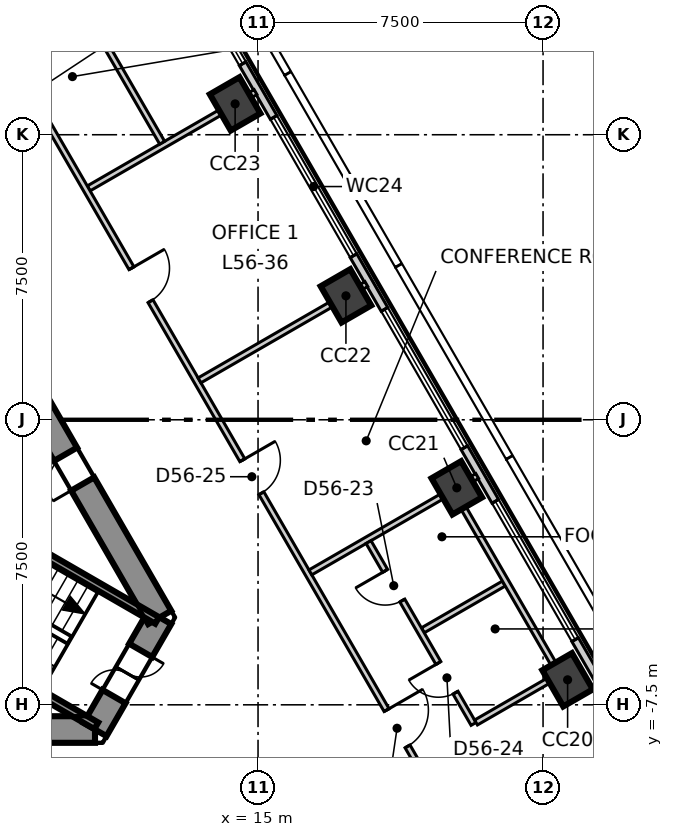
"""IFC4 building model, lengths in metres.
Left out: names, types, materials, properties, quantities, classifications, styles, units other than length and angle.
Written with IfcOpenShell. Run it as: python <this file> out.ifc"""

import sys

from ifc_helpers import new_model, si_unit, direction, frame, frame_2d, origin, origin_2d, place, context, subcontext, project, spatial, polyline, rectangle, outline, extrude, element, fill, save


model = new_model("IFC4")
c1 = context("Model", 3, precision=1e-05, world=origin(), true_north=direction((0.0, 1.0)))
c2 = subcontext(c1, "Body", "Model", "MODEL_VIEW")
j1 = project(units=[si_unit("LENGTHUNIT", "METRE"), si_unit("PLANEANGLEUNIT", "RADIAN")], contexts=[c1])
p1 = place(None, origin())
s1 = spatial("IfcSite", under=j1, at=p1, CompositionType="ELEMENT")
p2 = place(p1, origin())
s2 = spatial("IfcBuilding", under=s1, at=p2, CompositionType="ELEMENT")
p3 = place(p2, frame((0.0, 0.0, 239.3)))
s3 = spatial("IfcBuildingStorey", under=s2, at=p3, CompositionType="ELEMENT", Elevation=239.3)
p4 = place(p3, frame((-10.71, -8.15, -0.3), z_axis=(0.0, 0.0, 1.0), x_axis=(1.0, 0.0, 0.0)))
e1 = element("IfcWall", 1, at=p4, inside=s3, PredefinedType="SHEAR", context=c2, shape_type="SweptSolid", body=[
    extrude(outline(polyline([(-0.202, -0.35), (1.782, -0.35), (3.766, -0.35), (5.75, -0.35), (7.734, -0.35), (9.718, -0.35), (11.702, -0.35), (13.686, -0.35), (15.67, -0.35), (17.654, -0.35), (19.638, -0.35), (21.622, -0.35), (21.218, 0.35), (19.307, 0.35), (17.397, 0.35), (15.486, 0.35), (13.576, 0.35), (11.665, 0.35), (9.755, 0.35), (7.844, 0.35), (5.934, 0.35), (4.023, 0.35), (2.113, 0.35), (0.202, 0.35), (-0.202, -0.35)])), origin(), (0.0, 0.0, 1.0), 4.0),
])
p5 = place(p4, frame((9.81, 0.0, 0.3)))
e2 = element("IfcOpeningElement", 2, at=p5, cuts=e1, PredefinedType="OPENING", context=c2, shape_type="SweptSolid", body=[
    extrude(rectangle(XDim=1.8, YDim=2.1, at=frame_2d((0.9, 1.05))), frame((0.0, 0.36, 0.0), z_axis=(0.0, -1.0, 0.0), x_axis=(1.0, 0.0, 0.0)), (0.0, 0.0, 1.0), 0.72),
])
p6 = place(p3, frame((10.71, -8.15, -0.3), z_axis=(0.0, 0.0, 1.0), x_axis=(0.49999337185, 0.866029230515, 0.0)))
e3 = element("IfcWall", 3, at=p6, inside=s3, PredefinedType="SHEAR", context=c2, shape_type="SweptSolid", body=[
    extrude(outline(polyline([(-0.202, -0.35), (1.703, -0.35), (3.608, -0.35), (3.204, 0.35), (1.703, 0.35), (0.202, 0.35), (-0.202, -0.35)])), origin(), (0.0, 0.0, 1.0), 4.0),
])
p7 = place(p6, frame((1.003, 0.0, 0.3)))
e4 = element("IfcOpeningElement", 4, at=p7, cuts=e3, PredefinedType="OPENING", context=c2, shape_type="SweptSolid", body=[
    extrude(rectangle(XDim=1.4, YDim=2.1, at=frame_2d((0.7, 1.05))), frame((0.0, 0.36, 0.0), z_axis=(0.0, -1.0, 0.0), x_axis=(1.0, 0.0, 0.0)), (0.0, 0.0, 1.0), 0.72),
])
p8 = place(p3, frame((12.413, -5.2, -0.3), z_axis=(0.0, 0.0, 1.0), x_axis=(-0.500011533395, 0.866018744874, 0.0)))
e5 = element("IfcWall", 5, at=p8, inside=s3, PredefinedType="SHEAR", context=c2, shape_type="SweptSolid", body=[
    extrude(outline(polyline([(-0.202, -0.35), (1.782, -0.35), (3.766, -0.35), (5.75, -0.35), (7.734, -0.35), (9.718, -0.35), (11.702, -0.35), (13.686, -0.35), (15.67, -0.35), (17.654, -0.35), (19.638, -0.35), (21.622, -0.35), (21.218, 0.35), (19.307, 0.35), (17.397, 0.35), (15.486, 0.35), (13.576, 0.35), (11.665, 0.35), (9.755, 0.35), (7.844, 0.35), (5.934, 0.35), (4.023, 0.35), (2.113, 0.35), (0.202, 0.35), (-0.202, -0.35)])), origin(), (0.0, 0.0, 1.0), 4.0),
])
p9 = place(p8, frame((4.055, 0.0, 0.3)))
e6 = element("IfcOpeningElement", 6, at=p9, cuts=e5, PredefinedType="OPENING", context=c2, shape_type="SweptSolid", body=[
    extrude(rectangle(XDim=0.9, YDim=2.1, at=frame_2d((0.45, 1.05))), frame((0.0, 0.36, 0.0), z_axis=(0.0, -1.0, 0.0), x_axis=(1.0, 0.0, 0.0)), (0.0, 0.0, 1.0), 0.72),
])
p10 = place(p8, frame((16.415, 0.0, 0.3)))
e7 = element("IfcOpeningElement", 7, at=p10, cuts=e5, PredefinedType="OPENING", context=c2, shape_type="SweptSolid", body=[
    extrude(rectangle(XDim=1.0, YDim=2.1, at=frame_2d((0.5, 1.05))), frame((0.0, 0.36, 0.0), z_axis=(0.0, -1.0, 0.0), x_axis=(1.0, 0.0, 0.0)), (0.0, 0.0, 1.0), 0.72),
])
for number, where, z_axis, x_axis in (
    (8, (23.146, -6.842, -0.3), (0.0, 0.0, 1.0), (-0.5, 0.866, 0.0)),
    (9, (20.23, -1.791, -0.3), (0.0, 0.0, 1.0), (-0.5, 0.866, 0.0)),
    (10, (17.313, 3.261, -0.3), (0.0, 0.0, 1.0), (-0.5, 0.866, 0.0)),
    (11, (14.397, 8.312, -0.3), (0.0, 0.0, 1.0), (-0.5, 0.866, 0.0)),
):
    element("IfcColumn", number, at=place(p3, frame(where, z_axis=z_axis, x_axis=x_axis)), inside=s3, PredefinedType="COLUMN", context=c2, shape_type="SweptSolid", body=[
        extrude(rectangle(XDim=1.1, YDim=0.9, at=origin_2d()), origin(), (0.0, 0.0, 1.0), 4.0),
    ])
p11 = place(p3, frame((27.32, -12.671, 0.0), z_axis=(0.0, 0.0, 1.0), x_axis=(-0.499995097538, 0.866028234204, 0.0)))
e12 = element("IfcWall", 12, at=p11, inside=s3, PredefinedType="ELEMENTEDWALL", context=c2, shape_type="SweptSolid", body=[
    extrude(rectangle(XDim=49.247, YDim=0.2, at=frame_2d((24.623, 0.0))), origin(), (0.0, 0.0, 1.0), 3.7),
])
p12 = place(p11, frame((2.119, 0.0, 0.9)))
e13 = element("IfcOpeningElement", 13, at=p12, cuts=e12, PredefinedType="OPENING", context=c2, shape_type="SweptSolid", body=[
    extrude(rectangle(XDim=4.2, YDim=2.5, at=frame_2d((2.1, 1.25))), frame((0.0, 0.11, 0.0), z_axis=(0.0, -1.0, 0.0), x_axis=(1.0, 0.0, 0.0)), (0.0, 0.0, 1.0), 0.22),
])
p13 = place(p11, frame((7.952, 0.0, 0.9)))
e14 = element("IfcOpeningElement", 14, at=p13, cuts=e12, PredefinedType="OPENING", context=c2, shape_type="SweptSolid", body=[
    extrude(rectangle(XDim=4.2, YDim=2.5, at=frame_2d((2.1, 1.25))), frame((0.0, 0.11, 0.0), z_axis=(0.0, -1.0, 0.0), x_axis=(1.0, 0.0, 0.0)), (0.0, 0.0, 1.0), 0.22),
])
p14 = place(p11, frame((13.784, 0.0, 0.9)))
e15 = element("IfcOpeningElement", 15, at=p14, cuts=e12, PredefinedType="OPENING", context=c2, shape_type="SweptSolid", body=[
    extrude(rectangle(XDim=4.2, YDim=2.5, at=frame_2d((2.1, 1.25))), frame((0.0, 0.11, 0.0), z_axis=(0.0, -1.0, 0.0), x_axis=(1.0, 0.0, 0.0)), (0.0, 0.0, 1.0), 0.22),
])
p15 = place(p11, frame((19.617, 0.0, 0.9)))
e16 = element("IfcOpeningElement", 16, at=p15, cuts=e12, PredefinedType="OPENING", context=c2, shape_type="SweptSolid", body=[
    extrude(rectangle(XDim=4.2, YDim=2.5, at=frame_2d((2.1, 1.25))), frame((0.0, 0.11, 0.0), z_axis=(0.0, -1.0, 0.0), x_axis=(1.0, 0.0, 0.0)), (0.0, 0.0, 1.0), 0.22),
])
p16 = place(p11, frame((25.45, 0.0, 0.9)))
e17 = element("IfcOpeningElement", 17, at=p16, cuts=e12, PredefinedType="OPENING", context=c2, shape_type="SweptSolid", body=[
    extrude(rectangle(XDim=4.2, YDim=2.5, at=frame_2d((2.1, 1.25))), frame((0.0, 0.11, 0.0), z_axis=(0.0, -1.0, 0.0), x_axis=(1.0, 0.0, 0.0)), (0.0, 0.0, 1.0), 0.22),
])
p17 = place(p11, frame((31.282, 0.0, 0.9)))
e18 = element("IfcOpeningElement", 18, at=p17, cuts=e12, PredefinedType="OPENING", context=c2, shape_type="SweptSolid", body=[
    extrude(rectangle(XDim=4.2, YDim=2.5, at=frame_2d((2.1, 1.25))), frame((0.0, 0.11, 0.0), z_axis=(0.0, -1.0, 0.0), x_axis=(1.0, 0.0, 0.0)), (0.0, 0.0, 1.0), 0.22),
])
p18 = place(p11, frame((37.115, 0.0, 0.9)))
e19 = element("IfcOpeningElement", 19, at=p18, cuts=e12, PredefinedType="OPENING", context=c2, shape_type="SweptSolid", body=[
    extrude(rectangle(XDim=4.2, YDim=2.5, at=frame_2d((2.1, 1.25))), frame((0.0, 0.11, 0.0), z_axis=(0.0, -1.0, 0.0), x_axis=(1.0, 0.0, 0.0)), (0.0, 0.0, 1.0), 0.22),
])
p19 = place(p11, frame((42.947, 0.0, 0.9)))
e20 = element("IfcOpeningElement", 20, at=p19, cuts=e12, PredefinedType="OPENING", context=c2, shape_type="SweptSolid", body=[
    extrude(rectangle(XDim=4.2, YDim=2.5, at=frame_2d((2.1, 1.25))), frame((0.0, 0.11, 0.0), z_axis=(0.0, -1.0, 0.0), x_axis=(1.0, 0.0, 0.0)), (0.0, 0.0, 1.0), 0.22),
])
p20 = place(p3, frame((10.544, 6.088, 0.0), z_axis=(0.0, 0.0, 1.0), x_axis=(0.866065287345, 0.499930913282, 0.0)))
e21 = element("IfcWall", 21, at=p20, inside=s3, PredefinedType="PARTITIONING", context=c2, shape_type="SweptSolid", body=[
    extrude(rectangle(XDim=5.069, YDim=0.15, at=frame_2d((2.535, 0.0))), origin(), (0.0, 0.0, 1.0), 3.2),
])
p21 = place(p3, frame((0.075, 24.07, 0.0), z_axis=(0.0, 0.0, 1.0), x_axis=(0.500006834213, -0.866021458014, 0.0)))
e22 = element("IfcWall", 22, at=p21, inside=s3, PredefinedType="PARTITIONING", context=c2, shape_type="SweptSolid", body=[
    extrude(rectangle(XDim=41.616, YDim=0.15, at=frame_2d((20.808, 0.0))), origin(), (0.0, 0.0, 1.0), 3.7),
])
p22 = place(p21, frame((36.616, 0.0, 0.0)))
e23 = element("IfcOpeningElement", 23, at=p22, cuts=e22, PredefinedType="OPENING", context=c2, shape_type="SweptSolid", body=[
    extrude(rectangle(XDim=1.1, YDim=2.1, at=frame_2d((0.55, 1.05))), frame((0.0, 0.085, 0.0), z_axis=(0.0, -1.0, 0.0), x_axis=(1.0, 0.0, 0.0)), (0.0, 0.0, 1.0), 0.17),
])
p23 = place(p21, frame((29.024, 0.0, 0.0)))
e24 = element("IfcOpeningElement", 24, at=p23, cuts=e22, PredefinedType="OPENING", context=c2, shape_type="SweptSolid", body=[
    extrude(rectangle(XDim=1.0, YDim=2.1, at=frame_2d((0.5, 1.05))), frame((0.0, 0.085, 0.0), z_axis=(0.0, -1.0, 0.0), x_axis=(1.0, 0.0, 0.0)), (0.0, 0.0, 1.0), 0.17),
])
p24 = place(p21, frame((23.19, 0.0, 0.0)))
e25 = element("IfcOpeningElement", 25, at=p24, cuts=e22, PredefinedType="OPENING", context=c2, shape_type="SweptSolid", body=[
    extrude(rectangle(XDim=1.0, YDim=2.1, at=frame_2d((0.5, 1.05))), frame((0.0, 0.085, 0.0), z_axis=(0.0, -1.0, 0.0), x_axis=(1.0, 0.0, 0.0)), (0.0, 0.0, 1.0), 0.17),
])
p25 = place(p21, frame((14.458, 0.0, 0.0)))
e26 = element("IfcOpeningElement", 26, at=p25, cuts=e22, PredefinedType="OPENING", context=c2, shape_type="SweptSolid", body=[
    extrude(rectangle(XDim=1.1, YDim=2.1, at=frame_2d((0.55, 1.05))), frame((0.0, 0.085, 0.0), z_axis=(0.0, -1.0, 0.0), x_axis=(1.0, 0.0, 0.0)), (0.0, 0.0, 1.0), 0.17),
])
p26 = place(p21, frame((3.993, 0.0, 0.0)))
e27 = element("IfcOpeningElement", 27, at=p26, cuts=e22, PredefinedType="OPENING", context=c2, shape_type="SweptSolid", body=[
    extrude(rectangle(XDim=1.1, YDim=2.1, at=frame_2d((0.55, 1.05))), frame((0.0, 0.085, 0.0), z_axis=(0.0, -1.0, 0.0), x_axis=(1.0, 0.0, 0.0)), (0.0, 0.0, 1.0), 0.17),
])
p27 = place(p3, frame((13.46, 1.037, 0.0), z_axis=(0.0, 0.0, 1.0), x_axis=(0.866086140321, 0.499894786475, 0.0)))
e28 = element("IfcWall", 28, at=p27, inside=s3, PredefinedType="PARTITIONING", context=c2, shape_type="SweptSolid", body=[
    extrude(rectangle(XDim=5.069, YDim=0.15, at=frame_2d((2.534, 0.0))), origin(), (0.0, 0.0, 1.0), 3.7),
])
p28 = place(p3, frame((16.377, -4.016, 0.0), z_axis=(0.0, 0.0, 1.0), x_axis=(0.86598187042, 0.500075394419, 0.0)))
e29 = element("IfcWall", 29, at=p28, inside=s3, PredefinedType="PARTITIONING", context=c2, shape_type="SweptSolid", body=[
    extrude(rectangle(XDim=5.07, YDim=0.15, at=frame_2d((2.535, 0.0))), origin(), (0.0, 0.0, 1.0), 3.7),
])
p29 = place(p3, frame((6.72, 17.263, 0.0), z_axis=(0.0, 0.0, 1.0), x_axis=(0.499949415664, -0.866054606695, 0.0)))
e30 = element("IfcWall", 30, at=p29, inside=s3, PredefinedType="PARTITIONING", context=c2, shape_type="SweptSolid", body=[
    extrude(rectangle(XDim=11.515, YDim=0.15, at=frame_2d((5.758, 0.0))), origin(), (0.0, 0.0, 1.0), 3.7),
])
p30 = place(p29, frame((5.24, 0.0, 0.0)))
e31 = element("IfcOpeningElement", 31, at=p30, cuts=e30, PredefinedType="OPENING", context=c2, shape_type="SweptSolid", body=[
    extrude(rectangle(XDim=1.0, YDim=2.1, at=frame_2d((0.5, 1.05))), frame((0.0, 0.085, 0.0), z_axis=(0.0, -1.0, 0.0), x_axis=(1.0, 0.0, 0.0)), (0.0, 0.0, 1.0), 0.17),
])
p31 = place(p3, frame((19.336, -5.54, 0.0), z_axis=(0.0, 0.0, 1.0), x_axis=(0.866025399526, 0.500000007376, 0.0)))
e32 = element("IfcWall", 32, at=p31, inside=s3, PredefinedType="PARTITIONING", context=c2, shape_type="SweptSolid", body=[
    extrude(rectangle(XDim=2.462, YDim=0.15, at=frame_2d((1.231, 0.0))), origin(), (0.0, 0.0, 1.0), 3.7),
])
p32 = place(p3, frame((20.17, -1.912, 0.0), z_axis=(0.0, 0.0, 1.0), x_axis=(0.500083244257, -0.865977337356, 0.0)))
e33 = element("IfcWall", 33, at=p32, inside=s3, PredefinedType="PARTITIONING", context=c2, shape_type="SweptSolid", body=[
    extrude(rectangle(XDim=5.525, YDim=0.15, at=frame_2d((2.763, 0.0))), origin(), (0.0, 0.0, 1.0), 2.95),
])
p33 = place(p3, frame((17.908, -3.218, 0.0), z_axis=(0.0, 0.0, 1.0), x_axis=(0.500050108258, -0.865996471835, 0.0)))
e34 = element("IfcWall", 34, at=p33, inside=s3, PredefinedType="PARTITIONING", context=c2, shape_type="SweptSolid", body=[
    extrude(rectangle(XDim=5.525, YDim=0.15, at=frame_2d((2.763, 0.0))), origin(), (0.0, 0.0, 1.0), 3.7),
])
p34 = place(p33, frame((0.875, 0.0, 0.0)))
e35 = element("IfcOpeningElement", 35, at=p34, cuts=e34, PredefinedType="OPENING", context=c2, shape_type="SweptSolid", body=[
    extrude(rectangle(XDim=0.9, YDim=2.1, at=frame_2d((0.45, 1.05))), frame((0.0, 0.085, 0.0), z_axis=(0.0, -1.0, 0.0), x_axis=(1.0, 0.0, 0.0)), (0.0, 0.0, 1.0), 0.17),
])
p35 = place(p33, frame((3.675, 0.0, 0.0)))
e36 = element("IfcOpeningElement", 36, at=p35, cuts=e34, PredefinedType="OPENING", context=c2, shape_type="SweptSolid", body=[
    extrude(rectangle(XDim=0.9, YDim=2.1, at=frame_2d((0.45, 1.05))), frame((0.0, 0.085, 0.0), z_axis=(0.0, -1.0, 0.0), x_axis=(1.0, 0.0, 0.0)), (0.0, 0.0, 1.0), 0.17),
])
p36 = place(p3, frame((20.736, -7.965, 0.0), z_axis=(0.0, 0.0, 1.0), x_axis=(0.865957656801, 0.500117322864, 0.0)))
e37 = element("IfcWall", 37, at=p36, inside=s3, PredefinedType="PARTITIONING", context=c2, shape_type="SweptSolid", body=[
    extrude(rectangle(XDim=2.462, YDim=0.15, at=frame_2d((1.231, 0.0))), origin(), (0.0, 0.0, 1.0), 3.7),
])
p37 = place(p3, frame((4.929, -4.693, 0.0), z_axis=(0.0, 0.0, 1.0), x_axis=(0.865983344943, -0.500072840975, 0.0)))
e38 = element("IfcWall", 38, at=p37, inside=s3, PredefinedType="SOLIDWALL", context=c2, shape_type="SweptSolid", body=[
    extrude(rectangle(XDim=6.715, YDim=0.2, at=frame_2d((3.357, 0.0))), origin(), (0.0, 0.0, 1.0), 3.7),
])
p38 = place(p3, frame((6.529, -1.922, 0.0), z_axis=(0.0, 0.0, 1.0), x_axis=(0.866046323291, -0.499963764601, 0.0)))
e39 = element("IfcWall", 39, at=p38, inside=s3, PredefinedType="SOLIDWALL", context=c2, shape_type="SweptSolid", body=[
    extrude(rectangle(XDim=6.714, YDim=0.2, at=frame_2d((3.357, 0.0))), origin(), (0.0, 0.0, 1.0), 3.7),
])
p39 = place(p13, origin())
e40 = element("IfcWindow", 40, at=p39, inside=s3, PartitioningType="SINGLE_PANEL", PredefinedType="WINDOW", context=c2, shape_type="SweptSolid", body=[
    extrude(rectangle(XDim=4.2, YDim=2.5, at=frame_2d((2.1, 1.25))), frame((0.0, 0.03, 0.0), z_axis=(0.0, -1.0, 0.0), x_axis=(1.0, 0.0, 0.0)), (0.0, 0.0, 1.0), 0.06),
])
fill(e14, e40)
p40 = place(p14, origin())
e41 = element("IfcWindow", 41, at=p40, inside=s3, PartitioningType="SINGLE_PANEL", PredefinedType="WINDOW", context=c2, shape_type="SweptSolid", body=[
    extrude(rectangle(XDim=4.2, YDim=2.5, at=frame_2d((2.1, 1.25))), frame((0.0, 0.03, 0.0), z_axis=(0.0, -1.0, 0.0), x_axis=(1.0, 0.0, 0.0)), (0.0, 0.0, 1.0), 0.06),
])
fill(e15, e41)
p41 = place(p15, origin())
e42 = element("IfcWindow", 42, at=p41, inside=s3, PartitioningType="SINGLE_PANEL", PredefinedType="WINDOW", context=c2, shape_type="SweptSolid", body=[
    extrude(rectangle(XDim=4.2, YDim=2.5, at=frame_2d((2.1, 1.25))), frame((0.0, 0.03, 0.0), z_axis=(0.0, -1.0, 0.0), x_axis=(1.0, 0.0, 0.0)), (0.0, 0.0, 1.0), 0.06),
])
fill(e16, e42)
p42 = place(p16, origin())
e43 = element("IfcWindow", 43, at=p42, inside=s3, PartitioningType="SINGLE_PANEL", PredefinedType="WINDOW", context=c2, shape_type="SweptSolid", body=[
    extrude(rectangle(XDim=4.2, YDim=2.5, at=frame_2d((2.1, 1.25))), frame((0.0, 0.03, 0.0), z_axis=(0.0, -1.0, 0.0), x_axis=(1.0, 0.0, 0.0)), (0.0, 0.0, 1.0), 0.06),
])
fill(e17, e43)
p43 = place(p22, origin())
e44 = element("IfcDoor", 44, at=p43, inside=s3, OperationType="SINGLE_SWING_RIGHT", PredefinedType="DOOR", context=c2, shape_type="SweptSolid", body=[
    extrude(rectangle(XDim=1.1, YDim=2.1, at=frame_2d((0.55, 1.05))), frame((0.0, 0.025, 0.0), z_axis=(0.0, -1.0, 0.0), x_axis=(1.0, 0.0, 0.0)), (0.0, 0.0, 1.0), 0.05),
])
fill(e23, e44)
p44 = place(p34, origin())
e45 = element("IfcDoor", 45, at=p44, inside=s3, OperationType="SINGLE_SWING_LEFT", PredefinedType="DOOR", context=c2, shape_type="SweptSolid", body=[
    extrude(rectangle(XDim=0.9, YDim=2.1, at=frame_2d((0.45, 1.05))), frame((0.0, 0.025, 0.0), z_axis=(0.0, -1.0, 0.0), x_axis=(1.0, 0.0, 0.0)), (0.0, 0.0, 1.0), 0.05),
])
fill(e35, e45)
p45 = place(p35, origin())
e46 = element("IfcDoor", 46, at=p45, inside=s3, OperationType="SINGLE_SWING_LEFT", PredefinedType="DOOR", context=c2, shape_type="SweptSolid", body=[
    extrude(rectangle(XDim=0.9, YDim=2.1, at=frame_2d((0.45, 1.05))), frame((0.0, 0.025, 0.0), z_axis=(0.0, -1.0, 0.0), x_axis=(1.0, 0.0, 0.0)), (0.0, 0.0, 1.0), 0.05),
])
fill(e36, e46)
p46 = place(p23, origin())
e47 = element("IfcDoor", 47, at=p46, inside=s3, OperationType="SINGLE_SWING_RIGHT", PredefinedType="DOOR", context=c2, shape_type="SweptSolid", body=[
    extrude(rectangle(XDim=1.0, YDim=2.1, at=frame_2d((0.5, 1.05))), frame((0.0, 0.025, 0.0), z_axis=(0.0, -1.0, 0.0), x_axis=(1.0, 0.0, 0.0)), (0.0, 0.0, 1.0), 0.05),
])
fill(e24, e47)
p47 = place(p24, origin())
e48 = element("IfcDoor", 48, at=p47, inside=s3, OperationType="SINGLE_SWING_RIGHT", PredefinedType="DOOR", context=c2, shape_type="SweptSolid", body=[
    extrude(rectangle(XDim=1.0, YDim=2.1, at=frame_2d((0.5, 1.05))), frame((0.0, 0.025, 0.0), z_axis=(0.0, -1.0, 0.0), x_axis=(1.0, 0.0, 0.0)), (0.0, 0.0, 1.0), 0.05),
])
fill(e25, e48)
p48 = place(p7, origin())
e49 = element("IfcDoor", 49, at=p48, inside=s3, OperationType="DOUBLE_DOOR_SINGLE_SWING", PredefinedType="DOOR", context=c2, shape_type="SweptSolid", body=[
    extrude(rectangle(XDim=1.4, YDim=2.1, at=frame_2d((0.7, 1.05))), frame((0.0, 0.025, 0.0), z_axis=(0.0, -1.0, 0.0), x_axis=(1.0, 0.0, 0.0)), (0.0, 0.0, 1.0), 0.05),
])
fill(e4, e49)
p49 = place(p9, origin())
e50 = element("IfcDoor", 50, at=p49, inside=s3, OperationType="SINGLE_SWING_RIGHT", PredefinedType="DOOR", context=c2, shape_type="SweptSolid", body=[
    extrude(rectangle(XDim=0.9, YDim=2.1, at=frame_2d((0.45, 1.05))), frame((0.0, 0.025, 0.0), z_axis=(0.0, -1.0, 0.0), x_axis=(1.0, 0.0, 0.0)), (0.0, 0.0, 1.0), 0.05),
])
fill(e6, e50)
save(model, sys.argv[1])
